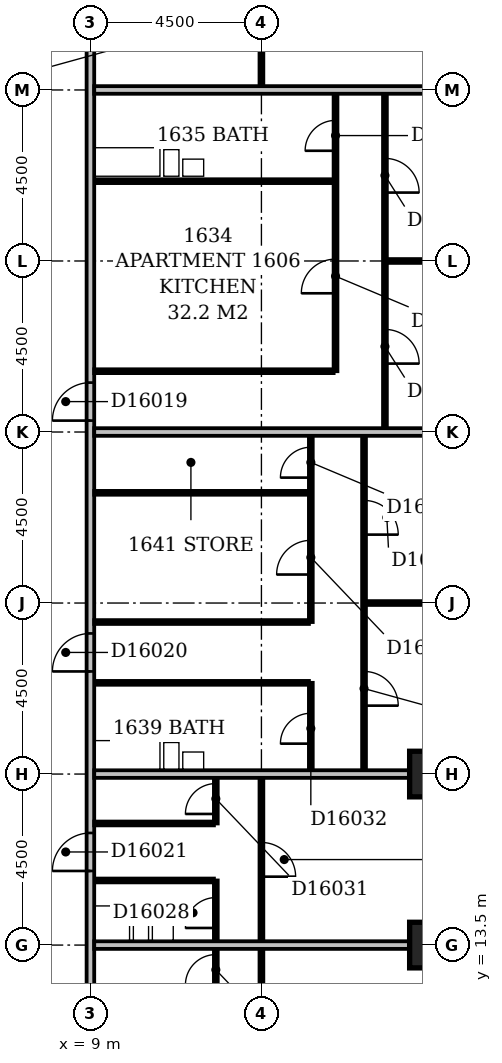
"""IFC4 building model, lengths in metres.
Left out: names, types, materials, properties, quantities, classifications, styles, units other than length and angle.
Written with IfcOpenShell. Run it as: python <this file> out.ifc"""

import sys

from ifc_helpers import new_model, si_unit, direction, frame, frame_2d, origin, origin_2d, place, context, subcontext, project, spatial, rectangle, extrude, element, fill, save


model = new_model("IFC4")
c1 = context("Model", 3, precision=1e-05, world=origin(), true_north=direction((0.0, 1.0)))
c2 = subcontext(c1, "Body", "Model", "MODEL_VIEW")
j1 = project(units=[si_unit("LENGTHUNIT", "METRE"), si_unit("PLANEANGLEUNIT", "RADIAN")], contexts=[c1])
p1 = place(None, origin())
s1 = spatial("IfcSite", under=j1, at=p1, CompositionType="ELEMENT")
p2 = place(p1, origin())
s2 = spatial("IfcBuilding", under=s1, at=p2, CompositionType="ELEMENT")
p3 = place(p2, frame((0.0, 0.0, 68.6)))
s3 = spatial("IfcBuildingStorey", under=s2, at=p3, CompositionType="ELEMENT", Elevation=68.6)
for number, where, z_axis, x_axis in (
    (1, (18.0, 13.5, -0.3), (0.0, 0.0, 1.0), (1.0, 0.0, 0.0)),
    (2, (18.0, 18.0, -0.3), (0.0, 0.0, 1.0), (1.0, 0.0, 0.0)),
):
    element("IfcColumn", number, at=place(p3, frame(where, z_axis=z_axis, x_axis=x_axis)), inside=s3, PredefinedType="COLUMN", context=c2, shape_type="SweptSolid", body=[
        extrude(rectangle(XDim=1.2, YDim=1.2, at=origin_2d()), origin(), (0.0, 0.0, 1.0), 3.6),
    ])
p4 = place(p3, frame((9.0, 5.0, 0.0), z_axis=(0.0, 0.0, 1.0), x_axis=(0.0, 1.0, 0.0)))
e3 = element("IfcWall", 3, at=p4, inside=s3, PredefinedType="PARTITIONING", context=c2, shape_type="SweptSolid", body=[
    extrude(rectangle(XDim=44.5, YDim=0.2, at=frame_2d((22.25, 0.0))), origin(), (0.0, 0.0, 1.0), 3.3),
])
p5 = place(p4, frame((22.3, 0.0, 0.0)))
e4 = element("IfcOpeningElement", 4, at=p5, cuts=e3, PredefinedType="OPENING", context=c2, shape_type="SweptSolid", body=[
    extrude(rectangle(XDim=1.0, YDim=2.1, at=frame_2d((0.5, 1.05))), frame((0.0, 0.112, 0.0), z_axis=(0.0, -1.0, 0.0), x_axis=(1.0, 0.0, 0.0)), (0.0, 0.0, 1.0), 0.224),
])
p6 = place(p4, frame((15.7, 0.0, 0.0)))
e5 = element("IfcOpeningElement", 5, at=p6, cuts=e3, PredefinedType="OPENING", context=c2, shape_type="SweptSolid", body=[
    extrude(rectangle(XDim=1.0, YDim=2.1, at=frame_2d((0.5, 1.05))), frame((0.0, 0.112, 0.0), z_axis=(0.0, -1.0, 0.0), x_axis=(1.0, 0.0, 0.0)), (0.0, 0.0, 1.0), 0.224),
])
p7 = place(p4, frame((10.45, 0.0, 0.0)))
e6 = element("IfcOpeningElement", 6, at=p7, cuts=e3, PredefinedType="OPENING", context=c2, shape_type="SweptSolid", body=[
    extrude(rectangle(XDim=1.0, YDim=2.1, at=frame_2d((0.5, 1.05))), frame((0.0, 0.112, 0.0), z_axis=(0.0, -1.0, 0.0), x_axis=(1.0, 0.0, 0.0)), (0.0, 0.0, 1.0), 0.224),
])
p8 = place(p4, frame((5.95, 0.0, 0.0)))
e7 = element("IfcOpeningElement", 7, at=p8, cuts=e3, PredefinedType="OPENING", context=c2, shape_type="SweptSolid", body=[
    extrude(rectangle(XDim=1.0, YDim=2.1, at=frame_2d((0.5, 1.05))), frame((0.0, 0.112, 0.0), z_axis=(0.0, -1.0, 0.0), x_axis=(1.0, 0.0, 0.0)), (0.0, 0.0, 1.0), 0.224),
])
p9 = place(p4, frame((37.25, 0.0, 0.0)))
e8 = element("IfcOpeningElement", 8, at=p9, cuts=e3, PredefinedType="OPENING", context=c2, shape_type="SweptSolid", body=[
    extrude(rectangle(XDim=0.9, YDim=2.1, at=frame_2d((0.45, 1.05))), frame((0.0, 0.112, 0.0), z_axis=(0.0, -1.0, 0.0), x_axis=(1.0, 0.0, 0.0)), (0.0, 0.0, 1.0), 0.224),
])
p10 = place(p4, frame((1.5, 0.0, 0.0)))
e9 = element("IfcOpeningElement", 9, at=p10, cuts=e3, PredefinedType="OPENING", context=c2, shape_type="SweptSolid", body=[
    extrude(rectangle(XDim=0.9, YDim=2.1, at=frame_2d((0.45, 1.05))), frame((0.0, 0.112, 0.0), z_axis=(0.0, -1.0, 0.0), x_axis=(1.0, 0.0, 0.0)), (0.0, 0.0, 1.0), 0.224),
])
p11 = place(p3, frame((13.5, 9.6, 0.0), z_axis=(0.0, 0.0, 1.0), x_axis=(0.0, 1.0, 0.0)))
e10 = element("IfcWall", 10, at=p11, inside=s3, PredefinedType="PARTITIONING", context=c2, shape_type="SweptSolid", body=[
    extrude(rectangle(XDim=8.3, YDim=0.1, at=frame_2d((4.15, 0.0))), origin(), (0.0, 0.0, 1.0), 3.3),
])
p12 = place(p11, frame((5.7, 0.0, 0.0)))
e11 = element("IfcOpeningElement", 11, at=p12, cuts=e10, PredefinedType="OPENING", context=c2, shape_type="SweptSolid", body=[
    extrude(rectangle(XDim=0.9, YDim=2.1, at=frame_2d((0.45, 1.05))), frame((0.0, 0.062, 0.0), z_axis=(0.0, -1.0, 0.0), x_axis=(1.0, 0.0, 0.0)), (0.0, 0.0, 1.0), 0.124),
])
p13 = place(p11, frame((1.2, 0.0, 0.0)))
e12 = element("IfcOpeningElement", 12, at=p13, cuts=e10, PredefinedType="OPENING", context=c2, shape_type="SweptSolid", body=[
    extrude(rectangle(XDim=0.9, YDim=2.1, at=frame_2d((0.45, 1.05))), frame((0.0, 0.062, 0.0), z_axis=(0.0, -1.0, 0.0), x_axis=(1.0, 0.0, 0.0)), (0.0, 0.0, 1.0), 0.124),
])
p14 = place(p3, frame((12.3, 12.2, 0.0), z_axis=(0.0, 0.0, 1.0), x_axis=(0.0, 1.0, 0.0)))
e13 = element("IfcWall", 13, at=p14, inside=s3, PredefinedType="PARTITIONING", context=c2, shape_type="SweptSolid", body=[
    extrude(rectangle(XDim=3.0, YDim=0.1, at=frame_2d((1.5, 0.0))), origin(), (0.0, 0.0, 1.0), 3.3),
])
p15 = place(p14, frame((1.75, 0.0, 0.0)))
e14 = element("IfcOpeningElement", 14, at=p15, cuts=e13, PredefinedType="OPENING", context=c2, shape_type="SweptSolid", body=[
    extrude(rectangle(XDim=0.8, YDim=2.1, at=frame_2d((0.4, 1.05))), frame((0.0, 0.062, 0.0), z_axis=(0.0, -1.0, 0.0), x_axis=(1.0, 0.0, 0.0)), (0.0, 0.0, 1.0), 0.124),
])
p16 = place(p14, frame((0.25, 0.0, 0.0)))
e15 = element("IfcOpeningElement", 15, at=p16, cuts=e13, PredefinedType="OPENING", context=c2, shape_type="SweptSolid", body=[
    extrude(rectangle(XDim=0.8, YDim=2.1, at=frame_2d((0.4, 1.05))), frame((0.0, 0.062, 0.0), z_axis=(0.0, -1.0, 0.0), x_axis=(1.0, 0.0, 0.0)), (0.0, 0.0, 1.0), 0.124),
])
p17 = place(p3, frame((9.1, 13.5, 0.0), z_axis=(0.0, 0.0, 1.0), x_axis=(1.0, 0.0, 0.0)))
e16 = element("IfcWall", 16, at=p17, inside=s3, PredefinedType="PARTITIONING", context=c2, shape_type="SweptSolid", body=[
    extrude(rectangle(XDim=8.3, YDim=0.2, at=frame_2d((4.15, 0.0))), origin(), (0.0, 0.0, 1.0), 3.3),
])
p18 = place(p3, frame((9.1, 15.2, 0.0), z_axis=(0.0, 0.0, 1.0), x_axis=(1.0, 0.0, 0.0)))
e17 = element("IfcWall", 17, at=p18, inside=s3, PredefinedType="PLUMBINGWALL", context=c2, shape_type="SweptSolid", body=[
    extrude(rectangle(XDim=3.15, YDim=0.1, at=frame_2d((1.575, 0.0))), origin(), (0.0, 0.0, 1.0), 3.3),
])
p19 = place(p3, frame((9.1, 16.7, 0.0), z_axis=(0.0, 0.0, 1.0), x_axis=(1.0, 0.0, 0.0)))
e18 = element("IfcWall", 18, at=p19, inside=s3, PredefinedType="PARTITIONING", context=c2, shape_type="SweptSolid", body=[
    extrude(rectangle(XDim=3.15, YDim=0.1, at=frame_2d((1.575, 0.0))), origin(), (0.0, 0.0, 1.0), 3.3),
])
p20 = place(p3, frame((12.3, 16.7, 0.0), z_axis=(0.0, 0.0, 1.0), x_axis=(0.0, 1.0, 0.0)))
e19 = element("IfcWall", 19, at=p20, inside=s3, PredefinedType="PARTITIONING", context=c2, shape_type="SweptSolid", body=[
    extrude(rectangle(XDim=1.2, YDim=0.1, at=frame_2d((0.6, 0.0))), origin(), (0.0, 0.0, 1.0), 3.3),
])
p21 = place(p20, frame((0.25, 0.0, 0.0)))
e20 = element("IfcOpeningElement", 20, at=p21, cuts=e19, PredefinedType="OPENING", context=c2, shape_type="SweptSolid", body=[
    extrude(rectangle(XDim=0.8, YDim=2.1, at=frame_2d((0.4, 1.05))), frame((0.0, 0.062, 0.0), z_axis=(0.0, -1.0, 0.0), x_axis=(1.0, 0.0, 0.0)), (0.0, 0.0, 1.0), 0.124),
])
p22 = place(p3, frame((9.1, 18.0, 0.0), z_axis=(0.0, 0.0, 1.0), x_axis=(1.0, 0.0, 0.0)))
e21 = element("IfcWall", 21, at=p22, inside=s3, PredefinedType="PARTITIONING", context=c2, shape_type="SweptSolid", body=[
    extrude(rectangle(XDim=8.3, YDim=0.2, at=frame_2d((4.15, 0.0))), origin(), (0.0, 0.0, 1.0), 2.6),
])
p23 = place(p3, frame((14.8, 18.1, 0.0), z_axis=(0.0, 0.0, 1.0), x_axis=(0.0, 1.0, 0.0)))
e22 = element("IfcWall", 22, at=p23, inside=s3, PredefinedType="PARTITIONING", context=c2, shape_type="SweptSolid", body=[
    extrude(rectangle(XDim=2.3, YDim=0.1, at=frame_2d((1.15, 0.0))), origin(), (0.0, 0.0, 1.0), 3.3),
])
p24 = place(p23, frame((0.7, 0.0, 0.0)))
e23 = element("IfcOpeningElement", 23, at=p24, cuts=e22, PredefinedType="OPENING", context=c2, shape_type="SweptSolid", body=[
    extrude(rectangle(XDim=0.8, YDim=2.1, at=frame_2d((0.4, 1.05))), frame((0.0, 0.062, 0.0), z_axis=(0.0, -1.0, 0.0), x_axis=(1.0, 0.0, 0.0)), (0.0, 0.0, 1.0), 0.124),
])
p25 = place(p3, frame((16.2, 18.1, 0.0), z_axis=(0.0, 0.0, 1.0), x_axis=(0.0, 1.0, 0.0)))
e24 = element("IfcWall", 24, at=p25, inside=s3, PredefinedType="PARTITIONING", context=c2, shape_type="SweptSolid", body=[
    extrude(rectangle(XDim=8.8, YDim=0.1, at=frame_2d((4.4, 0.0))), origin(), (0.0, 0.0, 1.0), 3.3),
])
p26 = place(p25, frame((1.7, 0.0, 0.0)))
e25 = element("IfcOpeningElement", 25, at=p26, cuts=e24, PredefinedType="OPENING", context=c2, shape_type="SweptSolid", body=[
    extrude(rectangle(XDim=0.9, YDim=2.1, at=frame_2d((0.45, 1.05))), frame((0.0, 0.062, 0.0), z_axis=(0.0, -1.0, 0.0), x_axis=(1.0, 0.0, 0.0)), (0.0, 0.0, 1.0), 0.124),
])
p27 = place(p25, frame((6.2, 0.0, 0.0)))
e26 = element("IfcOpeningElement", 26, at=p27, cuts=e24, PredefinedType="OPENING", context=c2, shape_type="SweptSolid", body=[
    extrude(rectangle(XDim=0.9, YDim=2.1, at=frame_2d((0.45, 1.05))), frame((0.0, 0.062, 0.0), z_axis=(0.0, -1.0, 0.0), x_axis=(1.0, 0.0, 0.0)), (0.0, 0.0, 1.0), 0.124),
])
p28 = place(p3, frame((9.1, 20.4, 0.0), z_axis=(0.0, 0.0, 1.0), x_axis=(1.0, 0.0, 0.0)))
e27 = element("IfcWall", 27, at=p28, inside=s3, PredefinedType="PLUMBINGWALL", context=c2, shape_type="SweptSolid", body=[
    extrude(rectangle(XDim=5.65, YDim=0.1, at=frame_2d((2.825, 0.0))), origin(), (0.0, 0.0, 1.0), 3.3),
])
p29 = place(p3, frame((9.1, 22.0, 0.0), z_axis=(0.0, 0.0, 1.0), x_axis=(1.0, 0.0, 0.0)))
e28 = element("IfcWall", 28, at=p29, inside=s3, PredefinedType="PARTITIONING", context=c2, shape_type="SweptSolid", body=[
    extrude(rectangle(XDim=5.65, YDim=0.1, at=frame_2d((2.825, 0.0))), origin(), (0.0, 0.0, 1.0), 3.3),
])
p30 = place(p3, frame((14.8, 22.0, 0.0), z_axis=(0.0, 0.0, 1.0), x_axis=(0.0, 1.0, 0.0)))
e29 = element("IfcWall", 29, at=p30, inside=s3, PredefinedType="PARTITIONING", context=c2, shape_type="SweptSolid", body=[
    extrude(rectangle(XDim=4.9, YDim=0.1, at=frame_2d((2.45, 0.0))), origin(), (0.0, 0.0, 1.0), 3.3),
])
p31 = place(p30, frame((1.25, 0.0, 0.0)))
e30 = element("IfcOpeningElement", 30, at=p31, cuts=e29, PredefinedType="OPENING", context=c2, shape_type="SweptSolid", body=[
    extrude(rectangle(XDim=0.9, YDim=2.1, at=frame_2d((0.45, 1.05))), frame((0.0, 0.062, 0.0), z_axis=(0.0, -1.0, 0.0), x_axis=(1.0, 0.0, 0.0)), (0.0, 0.0, 1.0), 0.124),
])
p32 = place(p30, frame((3.8, 0.0, 0.0)))
e31 = element("IfcOpeningElement", 31, at=p32, cuts=e29, PredefinedType="OPENING", context=c2, shape_type="SweptSolid", body=[
    extrude(rectangle(XDim=0.8, YDim=2.1, at=frame_2d((0.4, 1.05))), frame((0.0, 0.062, 0.0), z_axis=(0.0, -1.0, 0.0), x_axis=(1.0, 0.0, 0.0)), (0.0, 0.0, 1.0), 0.124),
])
for number, where, z_axis, x_axis in (
    (32, (16.25, 22.5, 0.0), (0.0, 0.0, 1.0), (1.0, 0.0, 0.0)),
    (33, (9.1, 25.4, 0.0), (0.0, 0.0, 1.0), (1.0, 0.0, 0.0)),
):
    element("IfcWall", number, at=place(p3, frame(where, z_axis=z_axis, x_axis=x_axis)), inside=s3, PredefinedType="PARTITIONING", context=c2, shape_type="SweptSolid", body=[
        extrude(rectangle(XDim=5.65, YDim=0.1, at=frame_2d((2.825, 0.0))), origin(), (0.0, 0.0, 1.0), 3.3),
    ])
p33 = place(p3, frame((9.1, 27.0, 0.0), z_axis=(0.0, 0.0, 1.0), x_axis=(1.0, 0.0, 0.0)))
e34 = element("IfcWall", 34, at=p33, inside=s3, PredefinedType="PARTITIONING", context=c2, shape_type="SweptSolid", body=[
    extrude(rectangle(XDim=12.8, YDim=0.2, at=frame_2d((6.4, 0.0))), origin(), (0.0, 0.0, 1.0), 2.7),
])
p34 = place(p3, frame((16.75, 27.1, 0.0), z_axis=(0.0, 0.0, 1.0), x_axis=(0.0, 1.0, 0.0)))
e35 = element("IfcWall", 35, at=p34, inside=s3, PredefinedType="PARTITIONING", context=c2, shape_type="SweptSolid", body=[
    extrude(rectangle(XDim=8.8, YDim=0.1, at=frame_2d((4.4, 0.0))), origin(), (0.0, 0.0, 1.0), 3.3),
])
p35 = place(p34, frame((1.7, 0.0, 0.0)))
e36 = element("IfcOpeningElement", 36, at=p35, cuts=e35, PredefinedType="OPENING", context=c2, shape_type="SweptSolid", body=[
    extrude(rectangle(XDim=0.9, YDim=2.1, at=frame_2d((0.45, 1.05))), frame((0.0, 0.062, 0.0), z_axis=(0.0, -1.0, 0.0), x_axis=(1.0, 0.0, 0.0)), (0.0, 0.0, 1.0), 0.124),
])
p36 = place(p34, frame((6.2, 0.0, 0.0)))
e37 = element("IfcOpeningElement", 37, at=p36, cuts=e35, PredefinedType="OPENING", context=c2, shape_type="SweptSolid", body=[
    extrude(rectangle(XDim=0.9, YDim=2.1, at=frame_2d((0.45, 1.05))), frame((0.0, 0.062, 0.0), z_axis=(0.0, -1.0, 0.0), x_axis=(1.0, 0.0, 0.0)), (0.0, 0.0, 1.0), 0.124),
])
p37 = place(p3, frame((9.1, 28.6, 0.0), z_axis=(0.0, 0.0, 1.0), x_axis=(1.0, 0.0, 0.0)))
e38 = element("IfcWall", 38, at=p37, inside=s3, PredefinedType="PARTITIONING", context=c2, shape_type="SweptSolid", body=[
    extrude(rectangle(XDim=6.3, YDim=0.1, at=frame_2d((3.15, 0.0))), origin(), (0.0, 0.0, 1.0), 3.3),
])
p38 = place(p3, frame((15.45, 28.6, 0.0), z_axis=(0.0, 0.0, 1.0), x_axis=(0.0, 1.0, 0.0)))
e39 = element("IfcWall", 39, at=p38, inside=s3, PredefinedType="PARTITIONING", context=c2, shape_type="SweptSolid", body=[
    extrude(rectangle(XDim=7.3, YDim=0.1, at=frame_2d((3.65, 0.0))), origin(), (0.0, 0.0, 1.0), 3.3),
])
p39 = place(p38, frame((5.8, 0.0, 0.0)))
e40 = element("IfcOpeningElement", 40, at=p39, cuts=e39, PredefinedType="OPENING", context=c2, shape_type="SweptSolid", body=[
    extrude(rectangle(XDim=0.8, YDim=2.1, at=frame_2d((0.4, 1.05))), frame((0.0, 0.062, 0.0), z_axis=(0.0, -1.0, 0.0), x_axis=(1.0, 0.0, 0.0)), (0.0, 0.0, 1.0), 0.124),
])
p40 = place(p38, frame((2.05, 0.0, 0.0)))
e41 = element("IfcOpeningElement", 41, at=p40, cuts=e39, PredefinedType="OPENING", context=c2, shape_type="SweptSolid", body=[
    extrude(rectangle(XDim=0.9, YDim=2.1, at=frame_2d((0.45, 1.05))), frame((0.0, 0.062, 0.0), z_axis=(0.0, -1.0, 0.0), x_axis=(1.0, 0.0, 0.0)), (0.0, 0.0, 1.0), 0.124),
])
p41 = place(p3, frame((16.8, 31.5, 0.0), z_axis=(0.0, 0.0, 1.0), x_axis=(1.0, 0.0, 0.0)))
e42 = element("IfcWall", 42, at=p41, inside=s3, PredefinedType="PARTITIONING", context=c2, shape_type="SweptSolid", body=[
    extrude(rectangle(XDim=5.1, YDim=0.1, at=frame_2d((2.55, 0.0))), origin(), (0.0, 0.0, 1.0), 3.3),
])
p42 = place(p3, frame((9.1, 33.6, 0.0), z_axis=(0.0, 0.0, 1.0), x_axis=(1.0, 0.0, 0.0)))
e43 = element("IfcWall", 43, at=p42, inside=s3, PredefinedType="PLUMBINGWALL", context=c2, shape_type="SweptSolid", body=[
    extrude(rectangle(XDim=6.3, YDim=0.1, at=frame_2d((3.15, 0.0))), origin(), (0.0, 0.0, 1.0), 3.3),
])
p43 = place(p3, frame((9.1, 36.0, 0.0), z_axis=(0.0, 0.0, 1.0), x_axis=(1.0, 0.0, 0.0)))
e44 = element("IfcWall", 44, at=p43, inside=s3, PredefinedType="PARTITIONING", context=c2, shape_type="SweptSolid", body=[
    extrude(rectangle(XDim=12.8, YDim=0.2, at=frame_2d((6.4, 0.0))), origin(), (0.0, 0.0, 1.0), 2.4),
])
p44 = place(p3, frame((13.5, 36.1, 0.0), z_axis=(0.0, 0.0, 1.0), x_axis=(0.0, 1.0, 0.0)))
e45 = element("IfcWall", 45, at=p44, inside=s3, PredefinedType="PARTITIONING", context=c2, shape_type="SweptSolid", body=[
    extrude(rectangle(XDim=13.3, YDim=0.1, at=frame_2d((6.65, 0.0))), origin(), (0.0, 0.0, 1.0), 3.3),
])
p45 = place(p5, origin())
e46 = element("IfcDoor", 46, at=p45, inside=s3, OperationType="SINGLE_SWING_LEFT", PredefinedType="DOOR", context=c2, shape_type="SweptSolid", body=[
    extrude(rectangle(XDim=1.0, YDim=2.1, at=frame_2d((0.5, 1.05))), frame((0.0, 0.025, 0.0), z_axis=(0.0, -1.0, 0.0), x_axis=(1.0, 0.0, 0.0)), (0.0, 0.0, 1.0), 0.05),
])
fill(e4, e46)
p46 = place(p6, origin())
e47 = element("IfcDoor", 47, at=p46, inside=s3, OperationType="SINGLE_SWING_LEFT", PredefinedType="DOOR", context=c2, shape_type="SweptSolid", body=[
    extrude(rectangle(XDim=1.0, YDim=2.1, at=frame_2d((0.5, 1.05))), frame((0.0, 0.025, 0.0), z_axis=(0.0, -1.0, 0.0), x_axis=(1.0, 0.0, 0.0)), (0.0, 0.0, 1.0), 0.05),
])
fill(e5, e47)
p47 = place(p7, origin())
e48 = element("IfcDoor", 48, at=p47, inside=s3, OperationType="SINGLE_SWING_LEFT", PredefinedType="DOOR", context=c2, shape_type="SweptSolid", body=[
    extrude(rectangle(XDim=1.0, YDim=2.1, at=frame_2d((0.5, 1.05))), frame((0.0, 0.025, 0.0), z_axis=(0.0, -1.0, 0.0), x_axis=(1.0, 0.0, 0.0)), (0.0, 0.0, 1.0), 0.05),
])
fill(e6, e48)
p48 = place(p12, frame((0.9, 0.0, 0.0), z_axis=(0.0, 0.0, 1.0), x_axis=(-1.0, 0.0, 0.0)))
e49 = element("IfcDoor", 49, at=p48, inside=s3, OperationType="SINGLE_SWING_RIGHT", PredefinedType="DOOR", context=c2, shape_type="SweptSolid", body=[
    extrude(rectangle(XDim=0.9, YDim=2.1, at=frame_2d((0.45, 1.05))), frame((0.0, 0.025, 0.0), z_axis=(0.0, -1.0, 0.0), x_axis=(1.0, 0.0, 0.0)), (0.0, 0.0, 1.0), 0.05),
])
fill(e11, e49)
p49 = place(p15, origin())
e50 = element("IfcDoor", 50, at=p49, inside=s3, OperationType="SINGLE_SWING_LEFT", PredefinedType="DOOR", context=c2, shape_type="SweptSolid", body=[
    extrude(rectangle(XDim=0.8, YDim=2.1, at=frame_2d((0.4, 1.05))), frame((0.0, 0.025, 0.0), z_axis=(0.0, -1.0, 0.0), x_axis=(1.0, 0.0, 0.0)), (0.0, 0.0, 1.0), 0.05),
])
fill(e14, e50)
p50 = place(p16, origin())
e51 = element("IfcDoor", 51, at=p50, inside=s3, OperationType="SINGLE_SWING_LEFT", PredefinedType="DOOR", context=c2, shape_type="SweptSolid", body=[
    extrude(rectangle(XDim=0.8, YDim=2.1, at=frame_2d((0.4, 1.05))), frame((0.0, 0.025, 0.0), z_axis=(0.0, -1.0, 0.0), x_axis=(1.0, 0.0, 0.0)), (0.0, 0.0, 1.0), 0.05),
])
fill(e15, e51)
p51 = place(p21, origin())
e52 = element("IfcDoor", 52, at=p51, inside=s3, OperationType="SINGLE_SWING_LEFT", PredefinedType="DOOR", context=c2, shape_type="SweptSolid", body=[
    extrude(rectangle(XDim=0.8, YDim=2.1, at=frame_2d((0.4, 1.05))), frame((0.0, 0.025, 0.0), z_axis=(0.0, -1.0, 0.0), x_axis=(1.0, 0.0, 0.0)), (0.0, 0.0, 1.0), 0.05),
])
fill(e20, e52)
p52 = place(p24, origin())
e53 = element("IfcDoor", 53, at=p52, inside=s3, OperationType="SINGLE_SWING_LEFT", PredefinedType="DOOR", context=c2, shape_type="SweptSolid", body=[
    extrude(rectangle(XDim=0.8, YDim=2.1, at=frame_2d((0.4, 1.05))), frame((0.0, 0.025, 0.0), z_axis=(0.0, -1.0, 0.0), x_axis=(1.0, 0.0, 0.0)), (0.0, 0.0, 1.0), 0.05),
])
fill(e23, e53)
p53 = place(p26, frame((0.9, 0.0, 0.0), z_axis=(0.0, 0.0, 1.0), x_axis=(-1.0, 0.0, 0.0)))
e54 = element("IfcDoor", 54, at=p53, inside=s3, OperationType="SINGLE_SWING_RIGHT", PredefinedType="DOOR", context=c2, shape_type="SweptSolid", body=[
    extrude(rectangle(XDim=0.9, YDim=2.1, at=frame_2d((0.45, 1.05))), frame((0.0, 0.025, 0.0), z_axis=(0.0, -1.0, 0.0), x_axis=(1.0, 0.0, 0.0)), (0.0, 0.0, 1.0), 0.05),
])
fill(e25, e54)
p54 = place(p27, frame((0.9, 0.0, 0.0), z_axis=(0.0, 0.0, 1.0), x_axis=(-1.0, 0.0, 0.0)))
e55 = element("IfcDoor", 55, at=p54, inside=s3, OperationType="SINGLE_SWING_RIGHT", PredefinedType="DOOR", context=c2, shape_type="SweptSolid", body=[
    extrude(rectangle(XDim=0.9, YDim=2.1, at=frame_2d((0.45, 1.05))), frame((0.0, 0.025, 0.0), z_axis=(0.0, -1.0, 0.0), x_axis=(1.0, 0.0, 0.0)), (0.0, 0.0, 1.0), 0.05),
])
fill(e26, e55)
p55 = place(p31, origin())
e56 = element("IfcDoor", 56, at=p55, inside=s3, OperationType="SINGLE_SWING_LEFT", PredefinedType="DOOR", context=c2, shape_type="SweptSolid", body=[
    extrude(rectangle(XDim=0.9, YDim=2.1, at=frame_2d((0.45, 1.05))), frame((0.0, 0.025, 0.0), z_axis=(0.0, -1.0, 0.0), x_axis=(1.0, 0.0, 0.0)), (0.0, 0.0, 1.0), 0.05),
])
fill(e30, e56)
p56 = place(p32, origin())
e57 = element("IfcDoor", 57, at=p56, inside=s3, OperationType="SINGLE_SWING_LEFT", PredefinedType="DOOR", context=c2, shape_type="SweptSolid", body=[
    extrude(rectangle(XDim=0.8, YDim=2.1, at=frame_2d((0.4, 1.05))), frame((0.0, 0.025, 0.0), z_axis=(0.0, -1.0, 0.0), x_axis=(1.0, 0.0, 0.0)), (0.0, 0.0, 1.0), 0.05),
])
fill(e31, e57)
p57 = place(p35, frame((0.9, 0.0, 0.0), z_axis=(0.0, 0.0, 1.0), x_axis=(-1.0, 0.0, 0.0)))
e58 = element("IfcDoor", 58, at=p57, inside=s3, OperationType="SINGLE_SWING_RIGHT", PredefinedType="DOOR", context=c2, shape_type="SweptSolid", body=[
    extrude(rectangle(XDim=0.9, YDim=2.1, at=frame_2d((0.45, 1.05))), frame((0.0, 0.025, 0.0), z_axis=(0.0, -1.0, 0.0), x_axis=(1.0, 0.0, 0.0)), (0.0, 0.0, 1.0), 0.05),
])
fill(e36, e58)
p58 = place(p36, frame((0.9, 0.0, 0.0), z_axis=(0.0, 0.0, 1.0), x_axis=(-1.0, 0.0, 0.0)))
e59 = element("IfcDoor", 59, at=p58, inside=s3, OperationType="SINGLE_SWING_RIGHT", PredefinedType="DOOR", context=c2, shape_type="SweptSolid", body=[
    extrude(rectangle(XDim=0.9, YDim=2.1, at=frame_2d((0.45, 1.05))), frame((0.0, 0.025, 0.0), z_axis=(0.0, -1.0, 0.0), x_axis=(1.0, 0.0, 0.0)), (0.0, 0.0, 1.0), 0.05),
])
fill(e37, e59)
p59 = place(p39, origin())
e60 = element("IfcDoor", 60, at=p59, inside=s3, OperationType="SINGLE_SWING_LEFT", PredefinedType="DOOR", context=c2, shape_type="SweptSolid", body=[
    extrude(rectangle(XDim=0.8, YDim=2.1, at=frame_2d((0.4, 1.05))), frame((0.0, 0.025, 0.0), z_axis=(0.0, -1.0, 0.0), x_axis=(1.0, 0.0, 0.0)), (0.0, 0.0, 1.0), 0.05),
])
fill(e40, e60)
p60 = place(p40, origin())
e61 = element("IfcDoor", 61, at=p60, inside=s3, OperationType="SINGLE_SWING_LEFT", PredefinedType="DOOR", context=c2, shape_type="SweptSolid", body=[
    extrude(rectangle(XDim=0.9, YDim=2.1, at=frame_2d((0.45, 1.05))), frame((0.0, 0.025, 0.0), z_axis=(0.0, -1.0, 0.0), x_axis=(1.0, 0.0, 0.0)), (0.0, 0.0, 1.0), 0.05),
])
fill(e41, e61)
save(model, sys.argv[1])
